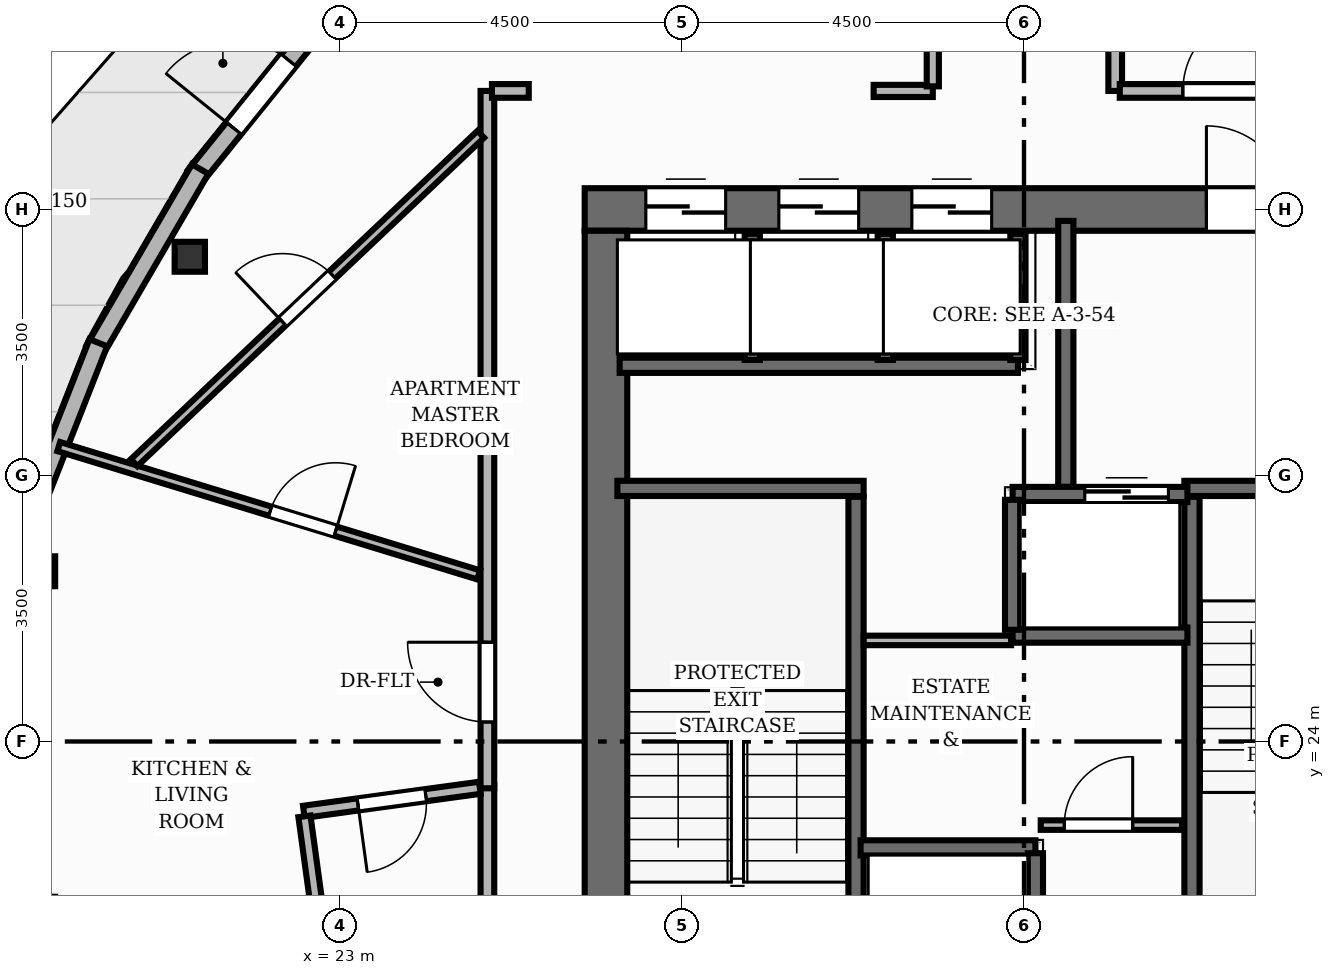
"""IFC4 building model, lengths in metres.
Left out: names, types, materials, properties, quantities, classifications, styles, units other than length and angle.
Written with IfcOpenShell. Run it as: python <this file> out.ifc"""

import sys

from ifc_helpers import new_model, si_unit, direction, frame, frame_2d, origin, origin_2d, place, context, subcontext, project, spatial, rectangle, i_section, extrude, element, fill, save


model = new_model("IFC4")
c1 = context("Model", 3, precision=1e-05, world=origin(), true_north=direction((0.0, 1.0)))
c2 = subcontext(c1, "Body", "Model", "MODEL_VIEW")
j1 = project(units=[si_unit("LENGTHUNIT", "METRE"), si_unit("PLANEANGLEUNIT", "RADIAN")], contexts=[c1])
p1 = place(None, origin())
s1 = spatial("IfcSite", under=j1, at=p1, CompositionType="ELEMENT")
p2 = place(p1, origin())
s2 = spatial("IfcBuilding", under=s1, at=p2, CompositionType="ELEMENT")
p3 = place(p2, frame((0.0, 0.0, 227.04)))
s3 = spatial("IfcBuildingStorey", under=s2, at=p3, CompositionType="ELEMENT", Elevation=227.04)
p4 = place(p3, frame((26.22, 31.0, 0.0), z_axis=(0.0, 0.0, 1.0), x_axis=(1.0, 0.0, 0.0)))
e1 = element("IfcWall", 1, at=p4, inside=s3, PredefinedType="SHEAR", context=c2, shape_type="SweptSolid", body=[
    extrude(rectangle(XDim=11.56, YDim=0.56, at=frame_2d((5.78, 0.0))), origin(), (0.0, 0.0, 1.0), 3.2),
])
p5 = place(p4, frame((8.18, 0.0, 0.0)))
e2 = element("IfcOpeningElement", 2, at=p5, cuts=e1, PredefinedType="OPENING", context=c2, shape_type="SweptSolid", body=[
    extrude(rectangle(XDim=1.1, YDim=2.15, at=frame_2d((0.55, 1.075))), frame((0.0, 0.29, 0.0), z_axis=(0.0, -1.0, 0.0), x_axis=(1.0, 0.0, 0.0)), (0.0, 0.0, 1.0), 0.58),
])
p6 = place(p4, frame((0.805, 0.0, 0.0)))
e3 = element("IfcOpeningElement", 3, at=p6, cuts=e1, PredefinedType="OPENING", context=c2, shape_type="SweptSolid", body=[
    extrude(rectangle(XDim=1.05, YDim=2.15, at=frame_2d((0.525, 1.075))), frame((0.0, 0.29, 0.0), z_axis=(0.0, -1.0, 0.0), x_axis=(1.0, 0.0, 0.0)), (0.0, 0.0, 1.0), 0.58),
])
p7 = place(p4, frame((2.555, 0.0, 0.0)))
e4 = element("IfcOpeningElement", 4, at=p7, cuts=e1, PredefinedType="OPENING", context=c2, shape_type="SweptSolid", body=[
    extrude(rectangle(XDim=1.05, YDim=2.15, at=frame_2d((0.525, 1.075))), frame((0.0, 0.29, 0.0), z_axis=(0.0, -1.0, 0.0), x_axis=(1.0, 0.0, 0.0)), (0.0, 0.0, 1.0), 0.58),
])
p8 = place(p4, frame((4.305, 0.0, 0.0)))
e5 = element("IfcOpeningElement", 5, at=p8, cuts=e1, PredefinedType="OPENING", context=c2, shape_type="SweptSolid", body=[
    extrude(rectangle(XDim=1.05, YDim=2.15, at=frame_2d((0.525, 1.075))), frame((0.0, 0.29, 0.0), z_axis=(0.0, -1.0, 0.0), x_axis=(1.0, 0.0, 0.0)), (0.0, 0.0, 1.0), 0.58),
])
p9 = place(p3, frame((26.5, 17.28, 0.0), z_axis=(0.0, 0.0, 1.0), x_axis=(0.0, 1.0, 0.0)))
e6 = element("IfcWall", 6, at=p9, inside=s3, PredefinedType="SHEAR", context=c2, shape_type="SweptSolid", body=[
    extrude(rectangle(XDim=13.44, YDim=0.56, at=frame_2d((6.72, 0.0))), origin(), (0.0, 0.0, 1.0), 3.2),
])
for number, where, z_axis, x_axis in (
    (7, (21.025, 30.378, 0.0), (0.0, 0.0, 1.0), (1.0, 0.0, 0.0)),
    (8, (19.054, 26.24, 0.0), (0.0, 0.0, 1.0), (1.0, 0.0, 0.0)),
):
    element("IfcColumn", number, at=place(p3, frame(where, z_axis=z_axis, x_axis=x_axis)), inside=s3, PredefinedType="COLUMN", context=c2, shape_type="SweptSolid", body=[
        extrude(i_section(OverallWidth=0.399, OverallDepth=0.394, WebThickness=0.023, FlangeThickness=0.037, at=origin_2d()), origin(), (0.0, 0.0, 1.0), 3.2),
    ])
p10 = place(p3, frame((21.1, 31.442, 0.0), z_axis=(0.0, 0.0, 1.0), x_axis=(0.628046541479, 0.778175778174, 0.0)))
e9 = element("IfcWall", 9, at=p10, inside=s3, PredefinedType="SOLIDWALL", context=c2, shape_type="SweptSolid", body=[
    extrude(rectangle(XDim=2.758, YDim=0.25, at=frame_2d((1.379, 0.0))), origin(), (0.0, 0.0, 1.0), 2.96),
])
p11 = place(p10, frame((0.804, 0.0, 0.0)))
e10 = element("IfcOpeningElement", 10, at=p11, cuts=e9, PredefinedType="OPENING", context=c2, shape_type="SweptSolid", body=[
    extrude(rectangle(XDim=1.15, YDim=2.2, at=frame_2d((0.575, 1.1))), frame((0.0, 0.135, 0.0), z_axis=(0.0, -1.0, 0.0), x_axis=(1.0, 0.0, 0.0)), (0.0, 0.0, 1.0), 0.27),
])
p12 = place(p3, frame((19.773, 29.149, 0.0), z_axis=(0.0, 0.0, 1.0), x_axis=(0.503177339128, 0.864183178144, 0.0)))
e11 = element("IfcWall", 11, at=p12, inside=s3, PredefinedType="SOLIDWALL", context=c2, shape_type="SweptSolid", body=[
    extrude(rectangle(XDim=2.758, YDim=0.25, at=frame_2d((1.379, 0.0))), origin(), (0.0, 0.0, 1.0), 2.96),
])
p13 = place(p3, frame((18.82, 26.698, 0.0), z_axis=(0.0, 0.0, 1.0), x_axis=(0.365588934877, 0.930776412838, 0.0)))
e12 = element("IfcWall", 12, at=p13, inside=s3, PredefinedType="SOLIDWALL", context=c2, shape_type="SweptSolid", body=[
    extrude(rectangle(XDim=2.739, YDim=0.25, at=frame_2d((1.369, 0.0))), origin(), (0.0, 0.0, 1.0), 2.577),
])
p14 = place(p3, frame((29.79, 20.78, 0.0), z_axis=(0.0, 0.0, 1.0), x_axis=(0.0, 1.0, 0.0)))
e13 = element("IfcWall", 13, at=p14, inside=s3, PredefinedType="SHEAR", context=c2, shape_type="SweptSolid", body=[
    extrude(rectangle(XDim=6.44, YDim=0.2, at=frame_2d((3.22, 0.0))), origin(), (0.0, 0.0, 1.0), 3.2),
])
p15 = place(p3, frame((26.65, 27.33, 0.0), z_axis=(0.0, 0.0, 1.0), x_axis=(1.0, 0.0, 0.0)))
e14 = element("IfcWall", 14, at=p15, inside=s3, PredefinedType="SHEAR", context=c2, shape_type="SweptSolid", body=[
    extrude(rectangle(XDim=3.24, YDim=0.2, at=frame_2d((1.62, 0.0))), origin(), (0.0, 0.0, 1.0), 3.2),
])
p16 = place(p3, frame((34.21, 20.78, 0.0), z_axis=(0.0, 0.0, 1.0), x_axis=(0.0, 1.0, 0.0)))
e15 = element("IfcWall", 15, at=p16, inside=s3, PredefinedType="SHEAR", context=c2, shape_type="SweptSolid", body=[
    extrude(rectangle(XDim=6.44, YDim=0.2, at=frame_2d((3.22, 0.0))), origin(), (0.0, 0.0, 1.0), 3.2),
])
p17 = place(p3, frame((34.11, 27.33, 0.0), z_axis=(0.0, 0.0, 1.0), x_axis=(1.0, 0.0, 0.0)))
e16 = element("IfcWall", 16, at=p17, inside=s3, PredefinedType="SHEAR", context=c2, shape_type="SweptSolid", body=[
    extrude(rectangle(XDim=3.24, YDim=0.2, at=frame_2d((1.62, 0.0))), origin(), (0.0, 0.0, 1.0), 3.2),
])
p18 = place(p17, frame((1.135, 0.0, 0.0)))
e17 = element("IfcOpeningElement", 17, at=p18, cuts=e16, PredefinedType="OPENING", context=c2, shape_type="SweptSolid", body=[
    extrude(rectangle(XDim=1.05, YDim=2.15, at=frame_2d((0.525, 1.075))), frame((0.0, 0.11, 0.0), z_axis=(0.0, -1.0, 0.0), x_axis=(1.0, 0.0, 0.0)), (0.0, 0.0, 1.0), 0.22),
])
p19 = place(p3, frame((32.55, 27.35, 0.0), z_axis=(0.0, 0.0, 1.0), x_axis=(0.0, 1.0, 0.0)))
e18 = element("IfcWall", 18, at=p19, inside=s3, PredefinedType="SHEAR", context=c2, shape_type="SweptSolid", body=[
    extrude(rectangle(XDim=3.5, YDim=0.2, at=frame_2d((1.75, 0.0))), origin(), (0.0, 0.0, 1.0), 3.2),
])
p20 = place(p3, frame((29.85, 22.6, 0.0), z_axis=(0.0, 0.0, 1.0), x_axis=(1.0, 0.0, 0.0)))
e19 = element("IfcWall", 19, at=p20, inside=s3, PredefinedType="SHEAR", context=c2, shape_type="SweptSolid", body=[
    extrude(rectangle(XDim=2.3, YDim=0.2, at=frame_2d((1.15, 0.0))), origin(), (0.0, 0.0, 1.0), 3.2),
])
p21 = place(p3, frame((32.15, 20.82, 0.0), z_axis=(0.0, 0.0, 1.0), x_axis=(0.0, 1.0, 0.0)))
e20 = element("IfcWall", 20, at=p21, inside=s3, PredefinedType="SHEAR", context=c2, shape_type="SweptSolid", body=[
    extrude(rectangle(XDim=1.71, YDim=0.2, at=frame_2d((0.855, 0.0))), origin(), (0.0, 0.0, 1.0), 3.2),
])
p22 = place(p3, frame((31.85, 27.25, 0.0), z_axis=(0.0, 0.0, 1.0), x_axis=(1.0, 0.0, 0.0)))
e21 = element("IfcWall", 21, at=p22, inside=s3, PredefinedType="SHEAR", context=c2, shape_type="SweptSolid", body=[
    extrude(rectangle(XDim=2.3, YDim=0.2, at=frame_2d((1.15, 0.0))), origin(), (0.0, 0.0, 1.0), 3.2),
])
p23 = place(p22, frame((0.95, 0.0, 0.0)))
e22 = element("IfcOpeningElement", 22, at=p23, cuts=e21, PredefinedType="OPENING", context=c2, shape_type="SweptSolid", body=[
    extrude(rectangle(XDim=1.1, YDim=2.15, at=frame_2d((0.55, 1.075))), frame((0.0, 0.11, 0.0), z_axis=(0.0, -1.0, 0.0), x_axis=(1.0, 0.0, 0.0)), (0.0, 0.0, 1.0), 0.22),
])
p24 = place(p3, frame((31.85, 25.4, 0.0), z_axis=(0.0, 0.0, 1.0), x_axis=(1.0, 0.0, 0.0)))
e23 = element("IfcWall", 23, at=p24, inside=s3, PredefinedType="SHEAR", context=c2, shape_type="SweptSolid", body=[
    extrude(rectangle(XDim=2.3, YDim=0.2, at=frame_2d((1.15, 0.0))), origin(), (0.0, 0.0, 1.0), 3.2),
])
p25 = place(p3, frame((31.85, 25.47, 0.0), z_axis=(0.0, 0.0, 1.0), x_axis=(0.0, 1.0, 0.0)))
e24 = element("IfcWall", 24, at=p25, inside=s3, PredefinedType="SHEAR", context=c2, shape_type="SweptSolid", body=[
    extrude(rectangle(XDim=1.71, YDim=0.2, at=frame_2d((0.855, 0.0))), origin(), (0.0, 0.0, 1.0), 3.2),
])
p26 = place(p3, frame((26.68, 28.95, 0.0), z_axis=(0.0, 0.0, 1.0), x_axis=(1.0, 0.0, 0.0)))
e25 = element("IfcWall", 25, at=p26, inside=s3, PredefinedType="SHEAR", context=c2, shape_type="SweptSolid", body=[
    extrude(rectangle(XDim=5.24, YDim=0.2, at=frame_2d((2.62, 0.0))), origin(), (0.0, 0.0, 1.0), 3.2),
])
for number, where, z_axis, x_axis in (
    (26, (31.92, 29.02, 0.0), (0.0, 0.0, 1.0), (0.0, 1.0, 0.0)),
    (27, (28.425, 29.02, 0.0), (0.0, 0.0, 1.0), (0.0, 1.0, 0.0)),
    (28, (30.175, 29.02, 0.0), (0.0, 0.0, 1.0), (0.0, 1.0, 0.0)),
):
    element("IfcWall", number, at=place(p3, frame(where, z_axis=z_axis, x_axis=x_axis)), inside=s3, PredefinedType="SHEAR", context=c2, shape_type="SweptSolid", body=[
        extrude(rectangle(XDim=1.66, YDim=0.2, at=frame_2d((0.83, 0.0))), origin(), (0.0, 0.0, 1.0), 3.2),
    ])
p27 = place(p3, frame((32.22, 22.9, 0.0), z_axis=(0.0, 0.0, 1.0), x_axis=(1.0, 0.0, 0.0)))
e29 = element("IfcWall", 29, at=p27, inside=s3, PredefinedType="PARTITIONING", context=c2, shape_type="SweptSolid", body=[
    extrude(rectangle(XDim=1.86, YDim=0.125, at=frame_2d((0.93, 0.0))), origin(), (0.0, 0.0, 1.0), 2.955),
])
p28 = place(p27, frame((0.31, 0.0, 0.0)))
e30 = element("IfcOpeningElement", 30, at=p28, cuts=e29, PredefinedType="OPENING", context=c2, shape_type="SweptSolid", body=[
    extrude(rectangle(XDim=0.9, YDim=2.1, at=frame_2d((0.45, 1.05))), frame((0.0, 0.073, 0.0), z_axis=(0.0, -1.0, 0.0), x_axis=(1.0, 0.0, 0.0)), (0.0, 0.0, 1.0), 0.145),
])
p29 = place(p3, frame((29.89, 25.33, 0.0), z_axis=(0.0, 0.0, 1.0), x_axis=(1.0, 0.0, 0.0)))
e31 = element("IfcWall", 31, at=p29, inside=s3, PredefinedType="PARTITIONING", context=c2, shape_type="SweptSolid", body=[
    extrude(rectangle(XDim=1.94, YDim=0.125, at=frame_2d((0.97, 0.0))), origin(), (0.0, 0.0, 1.0), 2.955),
])
p30 = place(p3, frame((24.94, 15.44, 0.0), z_axis=(0.0, 0.0, 1.0), x_axis=(0.0, 1.0, 0.0)))
e32 = element("IfcWall", 32, at=p30, inside=s3, PredefinedType="PARTITIONING", context=c2, shape_type="SweptSolid", body=[
    extrude(rectangle(XDim=7.982, YDim=0.18, at=frame_2d((3.991, 0.0))), origin(), (0.0, 0.0, 1.0), 2.955),
])
p31 = place(p3, frame((33.2, 33.65, 0.0), z_axis=(0.0, 0.0, 1.0), x_axis=(0.0, -1.0, 0.0)))
e33 = element("IfcWall", 33, at=p31, inside=s3, PredefinedType="PARTITIONING", context=c2, shape_type="SweptSolid", body=[
    extrude(rectangle(XDim=1.09, YDim=0.18, at=frame_2d((0.545, 0.0))), origin(), (0.0, 0.0, 1.0), 2.955),
])
p32 = place(p3, frame((33.26, 32.56, 0.0), z_axis=(0.0, 0.0, 1.0), x_axis=(1.0, 0.0, 0.0)))
e34 = element("IfcWall", 34, at=p32, inside=s3, PredefinedType="PARTITIONING", context=c2, shape_type="SweptSolid", body=[
    extrude(rectangle(XDim=5.8, YDim=0.18, at=frame_2d((2.9, 0.0))), origin(), (0.0, 0.0, 1.0), 2.955),
])
p33 = place(p32, frame((0.83, 0.0, 0.0)))
e35 = element("IfcOpeningElement", 35, at=p33, cuts=e34, PredefinedType="OPENING", context=c2, shape_type="SweptSolid", body=[
    extrude(rectangle(XDim=1.05, YDim=2.15, at=frame_2d((0.525, 1.075))), frame((0.0, 0.1, 0.0), z_axis=(0.0, -1.0, 0.0), x_axis=(1.0, 0.0, 0.0)), (0.0, 0.0, 1.0), 0.2),
])
p34 = place(p3, frame((30.022, 32.56, 0.0), z_axis=(0.0, 0.0, 1.0), x_axis=(1.0, 0.0, 0.0)))
e36 = element("IfcWall", 36, at=p34, inside=s3, PredefinedType="PLUMBINGWALL", context=c2, shape_type="SweptSolid", body=[
    extrude(rectangle(XDim=0.778, YDim=0.16, at=frame_2d((0.389, 0.0))), origin(), (0.0, 0.0, 1.0), 2.955),
])
p35 = place(p3, frame((30.8, 32.62, 0.0), z_axis=(0.0, 0.0, 1.0), x_axis=(0.0, 1.0, 0.0)))
e37 = element("IfcWall", 37, at=p35, inside=s3, PredefinedType="PLUMBINGWALL", context=c2, shape_type="SweptSolid", body=[
    extrude(rectangle(XDim=1.09, YDim=0.16, at=frame_2d((0.545, 0.0))), origin(), (0.0, 0.0, 1.0), 2.955),
])
p36 = place(p3, frame((24.94, 23.384, 0.0), z_axis=(0.0, 0.0, 1.0), x_axis=(0.0, 1.0, 0.0)))
e38 = element("IfcWall", 38, at=p36, inside=s3, PredefinedType="PARTITIONING", context=c2, shape_type="SweptSolid", body=[
    extrude(rectangle(XDim=9.176, YDim=0.18, at=frame_2d((4.588, 0.0))), origin(), (0.0, 0.0, 1.0), 2.955),
])
p37 = place(p36, frame((0.872, 0.0, 0.0)))
e39 = element("IfcOpeningElement", 39, at=p37, cuts=e38, PredefinedType="OPENING", context=c2, shape_type="SweptSolid", body=[
    extrude(rectangle(XDim=1.05, YDim=2.15, at=frame_2d((0.525, 1.075))), frame((0.0, 0.1, 0.0), z_axis=(0.0, -1.0, 0.0), x_axis=(1.0, 0.0, 0.0)), (0.0, 0.0, 1.0), 0.2),
])
p38 = place(p3, frame((25.0, 32.56, 0.0), z_axis=(0.0, 0.0, 1.0), x_axis=(1.0, 0.0, 0.0)))
e40 = element("IfcWall", 40, at=p38, inside=s3, PredefinedType="PARTITIONING", context=c2, shape_type="SweptSolid", body=[
    extrude(rectangle(XDim=0.484, YDim=0.18, at=frame_2d((0.242, 0.0))), origin(), (0.0, 0.0, 1.0), 2.955),
])
p39 = place(p3, frame((19.3, 27.88, 0.0), z_axis=(0.0, 0.0, 1.0), x_axis=(0.956360100331, -0.292190620136, 0.0)))
e41 = element("IfcWall", 41, at=p39, inside=s3, PredefinedType="PARTITIONING", context=c2, shape_type="SweptSolid", body=[
    extrude(rectangle(XDim=5.777, YDim=0.125, at=frame_2d((2.889, 0.0))), origin(), (0.0, 0.0, 1.0), 2.692),
])
p40 = place(p39, frame((2.909, 0.0, 0.0)))
e42 = element("IfcOpeningElement", 42, at=p40, cuts=e41, PredefinedType="OPENING", context=c2, shape_type="SweptSolid", body=[
    extrude(rectangle(XDim=0.9, YDim=2.1, at=frame_2d((0.45, 1.05))), frame((0.0, 0.073, 0.0), z_axis=(0.0, -1.0, 0.0), x_axis=(1.0, 0.0, 0.0)), (0.0, 0.0, 1.0), 0.145),
])
p41 = place(p3, frame((24.841, 23.391, 0.0), z_axis=(0.0, 0.0, 1.0), x_axis=(-0.990809817729, -0.135262356521, 0.0)))
e43 = element("IfcWall", 43, at=p41, inside=s3, PredefinedType="PLUMBINGWALL", context=c2, shape_type="SweptSolid", body=[
    extrude(rectangle(XDim=2.337, YDim=0.16, at=frame_2d((1.169, 0.0))), origin(), (0.0, 0.0, 1.0), 2.692),
])
p42 = place(p41, frame((0.719, 0.0, 0.0)))
e44 = element("IfcOpeningElement", 44, at=p42, cuts=e43, PredefinedType="OPENING", context=c2, shape_type="SweptSolid", body=[
    extrude(rectangle(XDim=0.9, YDim=2.1, at=frame_2d((0.45, 1.05))), frame((0.0, 0.09, 0.0), z_axis=(0.0, -1.0, 0.0), x_axis=(1.0, 0.0, 0.0)), (0.0, 0.0, 1.0), 0.18),
])
p43 = place(p3, frame((22.533, 23.015, 0.0), z_axis=(0.0, 0.0, 1.0), x_axis=(0.135203486235, -0.990817852741, 0.0)))
e45 = element("IfcWall", 45, at=p43, inside=s3, PredefinedType="PLUMBINGWALL", context=c2, shape_type="SweptSolid", body=[
    extrude(rectangle(XDim=4.224, YDim=0.16, at=frame_2d((2.112, 0.0))), origin(), (0.0, 0.0, 1.0), 2.955),
])
p44 = place(p3, frame((20.292, 27.668, 0.0), z_axis=(0.0, 0.0, 1.0), x_axis=(0.72596595756, 0.68773063656, 0.0)))
e46 = element("IfcWall", 46, at=p44, inside=s3, PredefinedType="PARTITIONING", context=c2, shape_type="SweptSolid", body=[
    extrude(rectangle(XDim=6.283, YDim=0.125, at=frame_2d((3.142, 0.0))), origin(), (0.0, 0.0, 1.0), 2.955),
])
p45 = place(p44, frame((2.692, 0.0, 0.0)))
e47 = element("IfcOpeningElement", 47, at=p45, cuts=e46, PredefinedType="OPENING", context=c2, shape_type="SweptSolid", body=[
    extrude(rectangle(XDim=0.9, YDim=2.1, at=frame_2d((0.45, 1.05))), frame((0.0, 0.073, 0.0), z_axis=(0.0, -1.0, 0.0), x_axis=(1.0, 0.0, 0.0)), (0.0, 0.0, 1.0), 0.145),
])
p46 = place(p11, origin())
e48 = element("IfcDoor", 48, at=p46, inside=s3, OperationType="SINGLE_SWING_LEFT", PredefinedType="DOOR", context=c2, shape_type="SweptSolid", body=[
    extrude(rectangle(XDim=1.15, YDim=2.2, at=frame_2d((0.575, 1.1))), frame((0.0, 0.025, 0.0), z_axis=(0.0, -1.0, 0.0), x_axis=(1.0, 0.0, 0.0)), (0.0, 0.0, 1.0), 0.05),
])
fill(e10, e48)
p47 = place(p5, origin())
e49 = element("IfcDoor", 49, at=p47, inside=s3, OperationType="SINGLE_SWING_LEFT", PredefinedType="DOOR", context=c2, shape_type="SweptSolid", body=[
    extrude(rectangle(XDim=1.1, YDim=2.15, at=frame_2d((0.55, 1.075))), frame((0.0, 0.025, 0.0), z_axis=(0.0, -1.0, 0.0), x_axis=(1.0, 0.0, 0.0)), (0.0, 0.0, 1.0), 0.05),
])
fill(e2, e49)
p48 = place(p23, origin())
e50 = element("IfcDoor", 50, at=p48, inside=s3, OperationType="DOUBLE_DOOR_SLIDING", PredefinedType="DOOR", context=c2, shape_type="SweptSolid", body=[
    extrude(rectangle(XDim=1.1, YDim=2.15, at=frame_2d((0.55, 1.075))), frame((0.0, 0.025, 0.0), z_axis=(0.0, -1.0, 0.0), x_axis=(1.0, 0.0, 0.0)), (0.0, 0.0, 1.0), 0.05),
])
fill(e22, e50)
p49 = place(p6, origin())
e51 = element("IfcDoor", 51, at=p49, inside=s3, OperationType="DOUBLE_DOOR_SLIDING", PredefinedType="DOOR", context=c2, shape_type="SweptSolid", body=[
    extrude(rectangle(XDim=1.05, YDim=2.15, at=frame_2d((0.525, 1.075))), frame((0.0, 0.025, 0.0), z_axis=(0.0, -1.0, 0.0), x_axis=(1.0, 0.0, 0.0)), (0.0, 0.0, 1.0), 0.05),
])
fill(e3, e51)
p50 = place(p7, origin())
e52 = element("IfcDoor", 52, at=p50, inside=s3, OperationType="DOUBLE_DOOR_SLIDING", PredefinedType="DOOR", context=c2, shape_type="SweptSolid", body=[
    extrude(rectangle(XDim=1.05, YDim=2.15, at=frame_2d((0.525, 1.075))), frame((0.0, 0.025, 0.0), z_axis=(0.0, -1.0, 0.0), x_axis=(1.0, 0.0, 0.0)), (0.0, 0.0, 1.0), 0.05),
])
fill(e4, e52)
p51 = place(p8, origin())
e53 = element("IfcDoor", 53, at=p51, inside=s3, OperationType="DOUBLE_DOOR_SLIDING", PredefinedType="DOOR", context=c2, shape_type="SweptSolid", body=[
    extrude(rectangle(XDim=1.05, YDim=2.15, at=frame_2d((0.525, 1.075))), frame((0.0, 0.025, 0.0), z_axis=(0.0, -1.0, 0.0), x_axis=(1.0, 0.0, 0.0)), (0.0, 0.0, 1.0), 0.05),
])
fill(e5, e53)
p52 = place(p28, origin())
e54 = element("IfcDoor", 54, at=p52, inside=s3, OperationType="SINGLE_SWING_RIGHT", PredefinedType="DOOR", context=c2, shape_type="SweptSolid", body=[
    extrude(rectangle(XDim=0.9, YDim=2.1, at=frame_2d((0.45, 1.05))), frame((0.0, 0.025, 0.0), z_axis=(0.0, -1.0, 0.0), x_axis=(1.0, 0.0, 0.0)), (0.0, 0.0, 1.0), 0.05),
])
fill(e30, e54)
p53 = place(p33, origin())
e55 = element("IfcDoor", 55, at=p53, inside=s3, OperationType="SINGLE_SWING_RIGHT", PredefinedType="DOOR", context=c2, shape_type="SweptSolid", body=[
    extrude(rectangle(XDim=1.05, YDim=2.15, at=frame_2d((0.525, 1.075))), frame((0.0, 0.025, 0.0), z_axis=(0.0, -1.0, 0.0), x_axis=(1.0, 0.0, 0.0)), (0.0, 0.0, 1.0), 0.05),
])
fill(e35, e55)
p54 = place(p37, origin())
e56 = element("IfcDoor", 56, at=p54, inside=s3, OperationType="SINGLE_SWING_RIGHT", PredefinedType="DOOR", context=c2, shape_type="SweptSolid", body=[
    extrude(rectangle(XDim=1.05, YDim=2.15, at=frame_2d((0.525, 1.075))), frame((0.0, 0.025, 0.0), z_axis=(0.0, -1.0, 0.0), x_axis=(1.0, 0.0, 0.0)), (0.0, 0.0, 1.0), 0.05),
])
fill(e39, e56)
p55 = place(p40, origin())
e57 = element("IfcDoor", 57, at=p55, inside=s3, OperationType="SINGLE_SWING_RIGHT", PredefinedType="DOOR", context=c2, shape_type="SweptSolid", body=[
    extrude(rectangle(XDim=0.9, YDim=2.1, at=frame_2d((0.45, 1.05))), frame((0.0, 0.025, 0.0), z_axis=(0.0, -1.0, 0.0), x_axis=(1.0, 0.0, 0.0)), (0.0, 0.0, 1.0), 0.05),
])
fill(e42, e57)
p56 = place(p45, origin())
e58 = element("IfcDoor", 58, at=p56, inside=s3, OperationType="SINGLE_SWING_LEFT", PredefinedType="DOOR", context=c2, shape_type="SweptSolid", body=[
    extrude(rectangle(XDim=0.9, YDim=2.1, at=frame_2d((0.45, 1.05))), frame((0.0, 0.025, 0.0), z_axis=(0.0, -1.0, 0.0), x_axis=(1.0, 0.0, 0.0)), (0.0, 0.0, 1.0), 0.05),
])
fill(e47, e58)
p57 = place(p42, origin())
e59 = element("IfcDoor", 59, at=p57, inside=s3, OperationType="SINGLE_SWING_RIGHT", PredefinedType="DOOR", context=c2, shape_type="SweptSolid", body=[
    extrude(rectangle(XDim=0.9, YDim=2.1, at=frame_2d((0.45, 1.05))), frame((0.0, 0.025, 0.0), z_axis=(0.0, -1.0, 0.0), x_axis=(1.0, 0.0, 0.0)), (0.0, 0.0, 1.0), 0.05),
])
fill(e44, e59)
save(model, sys.argv[1])
